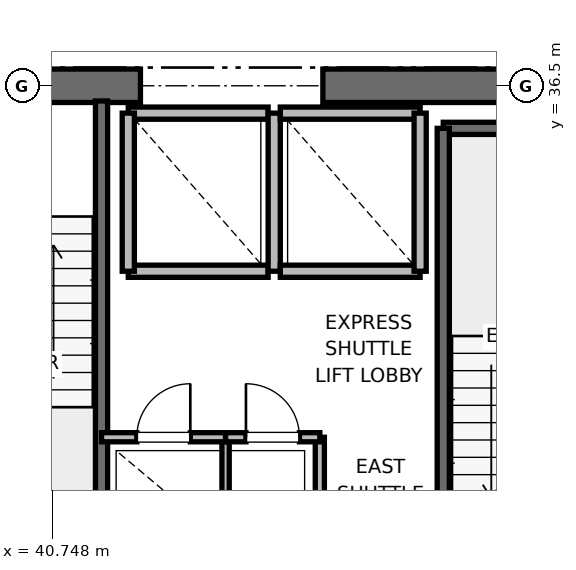
"""IFC4 building model, lengths in metres.
Left out: names, types, materials, properties, quantities, classifications, styles, units other than length and angle.
Written with IfcOpenShell. Run it as: python <this file> out.ifc"""

import sys

from ifc_helpers import new_model, si_unit, direction, frame, frame_2d, origin, place, context, subcontext, project, spatial, rectangle, extrude, element, fill, save


model = new_model("IFC4")
c1 = context("Model", 3, precision=1e-05, world=origin(), true_north=direction((0.0, 1.0)))
c2 = subcontext(c1, "Body", "Model", "MODEL_VIEW")
j1 = project(units=[si_unit("LENGTHUNIT", "METRE"), si_unit("PLANEANGLEUNIT", "RADIAN")], contexts=[c1])
p1 = place(None, origin())
s1 = spatial("IfcSite", under=j1, at=p1, CompositionType="ELEMENT")
p2 = place(p1, origin())
s2 = spatial("IfcBuilding", under=s1, at=p2, CompositionType="ELEMENT")
p3 = place(p2, frame((0.0, 0.0, 160.4)))
s3 = spatial("IfcBuildingStorey", under=s2, at=p3, CompositionType="ELEMENT", Elevation=160.4)
p4 = place(p3, frame((37.8, 36.5, 0.0), z_axis=(0.0, 0.0, 1.0), x_axis=(1.0, 0.0, 0.0)))
e1 = element("IfcWall", 1, at=p4, inside=s3, PredefinedType="SHEAR", context=c2, shape_type="SweptSolid", body=[
    extrude(rectangle(XDim=4.4, YDim=0.55, at=frame_2d((2.2, 0.0))), origin(), (0.0, 0.0, 1.0), 3.775),
])
p5 = place(p4, frame((1.65, 0.0, 0.0)))
e2 = element("IfcOpeningElement", 2, at=p5, cuts=e1, PredefinedType="OPENING", context=c2, shape_type="SweptSolid", body=[
    extrude(rectangle(XDim=1.1, YDim=2.15, at=frame_2d((0.55, 1.075))), frame((0.0, 0.275, 0.0), z_axis=(0.0, -1.0, 0.0), x_axis=(1.0, 0.0, 0.0)), (0.0, 0.0, 1.0), 0.55),
])
p6 = place(p3, frame((45.2, 36.5, 0.0), z_axis=(0.0, 0.0, 1.0), x_axis=(1.0, 0.0, 0.0)))
e3 = element("IfcWall", 3, at=p6, inside=s3, PredefinedType="SHEAR", context=c2, shape_type="SweptSolid", body=[
    extrude(rectangle(XDim=5.8, YDim=0.55, at=frame_2d((2.9, 0.0))), origin(), (0.0, 0.0, 1.0), 3.775),
])
p7 = place(p3, frame((47.18, 35.8, 0.0), z_axis=(0.0, 0.0, 1.0), x_axis=(1.0, 0.0, 0.0)))
e4 = element("IfcWall", 4, at=p7, inside=s3, PredefinedType="SOLIDWALL", context=c2, shape_type="SweptSolid", body=[
    extrude(rectangle(XDim=3.12, YDim=0.2, at=frame_2d((1.56, 0.0))), origin(), (0.0, 0.0, 1.0), 3.775),
])
p8 = place(p3, frame((47.18, 27.62, 0.0), z_axis=(0.0, 0.0, 1.0), x_axis=(0.0, 1.0, 0.0)))
e5 = element("IfcWall", 5, at=p8, inside=s3, PredefinedType="SOLIDWALL", context=c2, shape_type="SweptSolid", body=[
    extrude(rectangle(XDim=8.18, YDim=0.2, at=frame_2d((4.09, 0.0))), origin(), (0.0, 0.0, 1.0), 3.775),
])
p9 = place(p3, frame((41.56, 27.68, 0.0), z_axis=(0.0, 0.0, 1.0), x_axis=(0.0, 1.0, 0.0)))
e6 = element("IfcWall", 6, at=p9, inside=s3, PredefinedType="SOLIDWALL", context=c2, shape_type="SweptSolid", body=[
    extrude(rectangle(XDim=8.57, YDim=0.2, at=frame_2d((4.285, 0.0))), origin(), (0.0, 0.0, 1.0), 3.775),
])
p10 = place(p3, frame((42.0, 33.45, 0.0), z_axis=(0.0, 0.0, 1.0), x_axis=(1.0, 0.0, 0.0)))
e7 = element("IfcWall", 7, at=p10, inside=s3, PredefinedType="SOLIDWALL", context=c2, shape_type="SweptSolid", body=[
    extrude(rectangle(XDim=2.3, YDim=0.2, at=frame_2d((1.15, 0.0))), origin(), (0.0, 0.0, 1.0), 3.775),
])
p11 = place(p3, frame((44.3, 36.05, 0.0), z_axis=(0.0, 0.0, 1.0), x_axis=(-1.0, 0.0, 0.0)))
e8 = element("IfcWall", 8, at=p11, inside=s3, PredefinedType="SOLIDWALL", context=c2, shape_type="SweptSolid", body=[
    extrude(rectangle(XDim=2.3, YDim=0.2, at=frame_2d((1.15, 0.0))), origin(), (0.0, 0.0, 1.0), 2.755),
])
for number, where, z_axis, x_axis in (
    (9, (42.0, 36.05, 0.0), (0.0, 0.0, 1.0), (0.0, -1.0, 0.0)),
    (10, (44.4, 33.45, 0.0), (0.0, 0.0, 1.0), (0.0, 1.0, 0.0)),
):
    element("IfcWall", number, at=place(p3, frame(where, z_axis=z_axis, x_axis=x_axis)), inside=s3, PredefinedType="SOLIDWALL", context=c2, shape_type="SweptSolid", body=[
        extrude(rectangle(XDim=2.6, YDim=0.2, at=frame_2d((1.3, 0.0))), origin(), (0.0, 0.0, 1.0), 2.755),
    ])
p12 = place(p3, frame((44.5, 33.45, 0.0), z_axis=(0.0, 0.0, 1.0), x_axis=(1.0, 0.0, 0.0)))
e11 = element("IfcWall", 11, at=p12, inside=s3, PredefinedType="SOLIDWALL", context=c2, shape_type="SweptSolid", body=[
    extrude(rectangle(XDim=2.3, YDim=0.2, at=frame_2d((1.15, 0.0))), origin(), (0.0, 0.0, 1.0), 3.775),
])
p13 = place(p3, frame((46.8, 36.05, 0.0), z_axis=(0.0, 0.0, 1.0), x_axis=(-1.0, 0.0, 0.0)))
e12 = element("IfcWall", 12, at=p13, inside=s3, PredefinedType="SOLIDWALL", context=c2, shape_type="SweptSolid", body=[
    extrude(rectangle(XDim=2.3, YDim=0.2, at=frame_2d((1.15, 0.0))), origin(), (0.0, 0.0, 1.0), 2.755),
])
p14 = place(p3, frame((46.8, 33.45, 0.0), z_axis=(0.0, 0.0, 1.0), x_axis=(0.0, 1.0, 0.0)))
e13 = element("IfcWall", 13, at=p14, inside=s3, PredefinedType="SOLIDWALL", context=c2, shape_type="SweptSolid", body=[
    extrude(rectangle(XDim=2.6, YDim=0.2, at=frame_2d((1.3, 0.0))), origin(), (0.0, 0.0, 1.0), 3.775),
])
p15 = place(p3, frame((45.15, 27.62, 0.0), z_axis=(0.0, 0.0, 1.0), x_axis=(0.0, 1.0, 0.0)))
e14 = element("IfcWall", 14, at=p15, inside=s3, PredefinedType="PARTITIONING", context=c2, shape_type="SweptSolid", body=[
    extrude(rectangle(XDim=3.1, YDim=0.15, at=frame_2d((1.55, 0.0))), origin(), (0.0, 0.0, 1.0), 2.85),
])
p16 = place(p3, frame((43.6, 27.68, 0.0), z_axis=(0.0, 0.0, 1.0), x_axis=(0.0, 1.0, 0.0)))
e15 = element("IfcWall", 15, at=p16, inside=s3, PredefinedType="PARTITIONING", context=c2, shape_type="SweptSolid", body=[
    extrude(rectangle(XDim=3.04, YDim=0.12, at=frame_2d((1.52, 0.0))), origin(), (0.0, 0.0, 1.0), 2.85),
])
p17 = place(p3, frame((41.56, 30.72, 0.0), z_axis=(0.0, 0.0, 1.0), x_axis=(1.0, 0.0, 0.0)))
e16 = element("IfcWall", 16, at=p17, inside=s3, PredefinedType="PARTITIONING", context=c2, shape_type="SweptSolid", body=[
    extrude(rectangle(XDim=2.04, YDim=0.15, at=frame_2d((1.02, 0.0))), origin(), (0.0, 0.0, 1.0), 2.85),
])
p18 = place(p17, frame((0.58, 0.0, 0.0)))
e17 = element("IfcOpeningElement", 17, at=p18, cuts=e16, PredefinedType="OPENING", context=c2, shape_type="SweptSolid", body=[
    extrude(rectangle(XDim=0.88, YDim=2.1, at=frame_2d((0.44, 1.05))), frame((0.0, 0.075, 0.0), z_axis=(0.0, -1.0, 0.0), x_axis=(1.0, 0.0, 0.0)), (0.0, 0.0, 1.0), 0.15),
])
p19 = place(p3, frame((43.6, 30.72, 0.0), z_axis=(0.0, 0.0, 1.0), x_axis=(1.0, 0.0, 0.0)))
e18 = element("IfcWall", 18, at=p19, inside=s3, PredefinedType="PARTITIONING", context=c2, shape_type="SweptSolid", body=[
    extrude(rectangle(XDim=1.55, YDim=0.15, at=frame_2d((0.775, 0.0))), origin(), (0.0, 0.0, 1.0), 2.85),
])
p20 = place(p19, frame((0.335, 0.0, 0.0)))
e19 = element("IfcOpeningElement", 19, at=p20, cuts=e18, PredefinedType="OPENING", context=c2, shape_type="SweptSolid", body=[
    extrude(rectangle(XDim=0.88, YDim=2.1, at=frame_2d((0.44, 1.05))), frame((0.0, 0.075, 0.0), z_axis=(0.0, -1.0, 0.0), x_axis=(1.0, 0.0, 0.0)), (0.0, 0.0, 1.0), 0.15),
])
p21 = place(p18, origin())
e20 = element("IfcDoor", 20, at=p21, inside=s3, OperationType="SINGLE_SWING_RIGHT", PredefinedType="DOOR", context=c2, shape_type="SweptSolid", body=[
    extrude(rectangle(XDim=0.88, YDim=2.1, at=frame_2d((0.44, 1.05))), frame((0.0, 0.025, 0.0), z_axis=(0.0, -1.0, 0.0), x_axis=(1.0, 0.0, 0.0)), (0.0, 0.0, 1.0), 0.05),
])
fill(e17, e20)
p22 = place(p20, origin())
e21 = element("IfcDoor", 21, at=p22, inside=s3, OperationType="SINGLE_SWING_LEFT", PredefinedType="DOOR", context=c2, shape_type="SweptSolid", body=[
    extrude(rectangle(XDim=0.88, YDim=2.1, at=frame_2d((0.44, 1.05))), frame((0.0, 0.025, 0.0), z_axis=(0.0, -1.0, 0.0), x_axis=(1.0, 0.0, 0.0)), (0.0, 0.0, 1.0), 0.05),
])
fill(e19, e21)
save(model, sys.argv[1])
